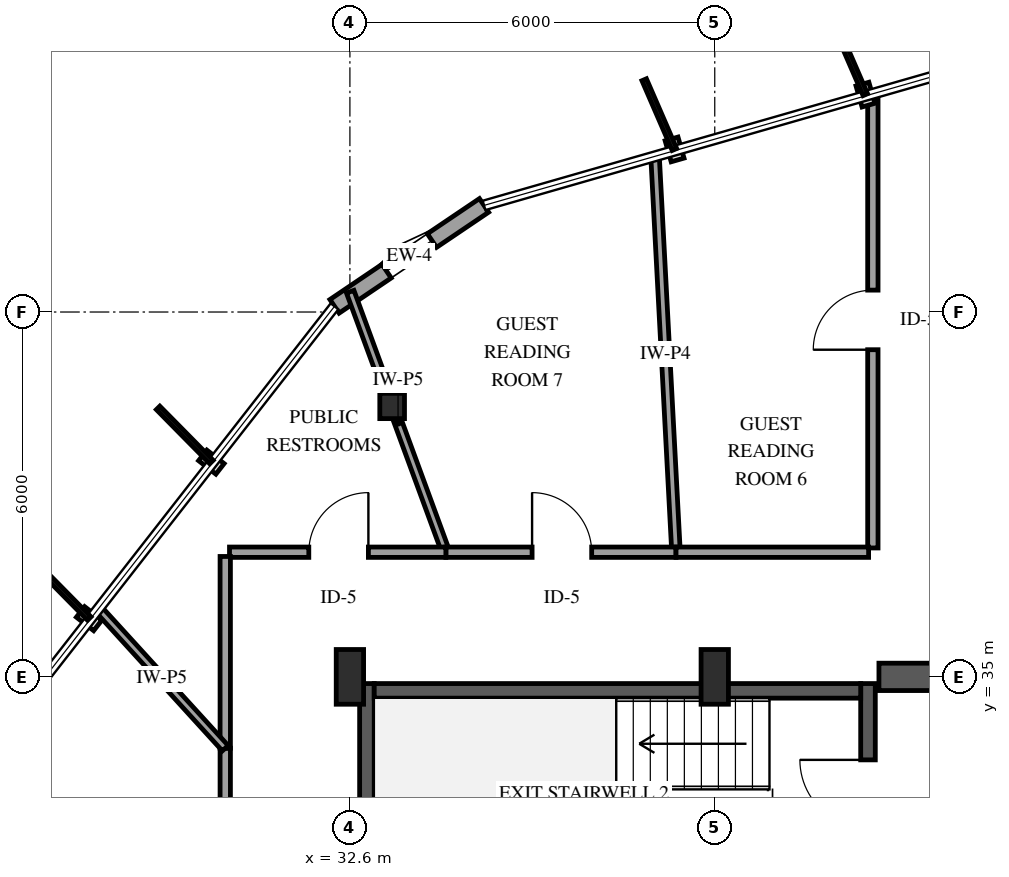
"""IFC4 building model, lengths in metres.
Left out: names, types, materials, properties, quantities, classifications, styles, units other than length and angle.
Written with IfcOpenShell. Run it as: python <this file> out.ifc"""

import sys

from ifc_helpers import new_model, si_unit, direction, frame, frame_2d, origin, origin_2d, place, context, subcontext, project, spatial, rectangle, i_section, extrude, element, fill, save


model = new_model("IFC4")
c1 = context("Model", 3, precision=1e-05, world=origin(), true_north=direction((0.0, 1.0)))
c2 = subcontext(c1, "Body", "Model", "MODEL_VIEW")
j1 = project(units=[si_unit("LENGTHUNIT", "METRE"), si_unit("PLANEANGLEUNIT", "RADIAN")], contexts=[c1])
p1 = place(None, origin())
s1 = spatial("IfcSite", under=j1, at=p1, CompositionType="ELEMENT")
p2 = place(p1, origin())
s2 = spatial("IfcBuilding", under=s1, at=p2, CompositionType="ELEMENT")
p3 = place(p2, frame((0.0, 0.0, 223.0)))
s3 = spatial("IfcBuildingStorey", under=s2, at=p3, CompositionType="ELEMENT", Elevation=223.0)
p4 = place(p3, frame((32.88, 31.26, 0.0), z_axis=(0.0, 0.0, 1.0), x_axis=(0.0, 1.0, 0.0)))
e1 = element("IfcWall", 1, at=p4, inside=s3, PredefinedType="SHEAR", context=c2, shape_type="SweptSolid", body=[
    extrude(rectangle(XDim=3.63, YDim=0.24, at=frame_2d((1.815, 0.0))), origin(), (0.0, 0.0, 1.0), 3.6),
])
p5 = place(p3, frame((41.12, 31.26, 0.0), z_axis=(0.0, 0.0, 1.0), x_axis=(0.0, 1.0, 0.0)))
e2 = element("IfcWall", 2, at=p5, inside=s3, PredefinedType="SHEAR", context=c2, shape_type="SweptSolid", body=[
    extrude(rectangle(XDim=3.63, YDim=0.24, at=frame_2d((1.815, 0.0))), origin(), (0.0, 0.0, 1.0), 3.6),
])
p6 = place(p5, frame((1.255, 0.0, 0.0)))
e3 = element("IfcOpeningElement", 3, at=p6, cuts=e2, PredefinedType="OPENING", context=c2, shape_type="SweptSolid", body=[
    extrude(rectangle(XDim=1.12, YDim=2.15, at=frame_2d((0.56, 1.075))), frame((0.0, 0.13, 0.0), z_axis=(0.0, -1.0, 0.0), x_axis=(1.0, 0.0, 0.0)), (0.0, 0.0, 1.0), 0.26),
])
p7 = place(p3, frame((33.0, 34.77, 0.0), z_axis=(0.0, 0.0, 1.0), x_axis=(1.0, 0.0, 0.0)))
e4 = element("IfcWall", 4, at=p7, inside=s3, PredefinedType="SHEAR", context=c2, shape_type="SweptSolid", body=[
    extrude(rectangle(XDim=8.0, YDim=0.24, at=frame_2d((4.0, 0.0))), origin(), (0.0, 0.0, 1.0), 3.6),
])
p8 = place(p3, frame((41.3, 35.0, 0.0), z_axis=(0.0, 0.0, 1.0), x_axis=(1.0, 0.0, 0.0)))
e5 = element("IfcWall", 5, at=p8, inside=s3, PredefinedType="SHEAR", context=c2, shape_type="SweptSolid", body=[
    extrude(rectangle(XDim=2.85, YDim=0.45, at=frame_2d((1.425, 0.0))), origin(), (0.0, 0.0, 1.0), 3.6),
])
for number, where, z_axis, x_axis in (
    (6, (32.6, 35.0, 0.0), (0.0, 0.0, 1.0), (1.0, 0.0, 0.0)),
    (7, (38.6, 35.0, 0.0), (0.0, 0.0, 1.0), (1.0, 0.0, 0.0)),
):
    element("IfcColumn", number, at=place(p3, frame(where, z_axis=z_axis, x_axis=x_axis)), inside=s3, PredefinedType="PILASTER", context=c2, shape_type="SweptSolid", body=[
        extrude(rectangle(XDim=0.45, YDim=0.9, at=origin_2d()), origin(), (0.0, 0.0, 1.0), 3.6),
    ])
p9 = place(p3, frame((33.295, 39.455, 0.0), z_axis=(0.0, 0.0, 1.0), x_axis=(1.0, 0.0, 0.0)))
e8 = element("IfcColumn", 8, at=p9, inside=s3, PredefinedType="COLUMN", context=c2, shape_type="SweptSolid", body=[
    extrude(i_section(OverallWidth=0.406, OverallDepth=0.416, WebThickness=0.03, FlangeThickness=0.048, FilletRadius=0.038, at=origin_2d()), origin(), (0.0, 0.0, 1.0), 3.6),
])
p10 = place(p3, frame((34.806, 42.753, 0.0), z_axis=(0.0, 0.0, 1.0), x_axis=(-0.828845811755, -0.559477095453, 0.0)))
e9 = element("IfcWall", 9, at=p10, inside=s3, PredefinedType="SOLIDWALL", context=c2, shape_type="SweptSolid", body=[
    extrude(rectangle(XDim=2.967, YDim=0.27, at=frame_2d((1.483, 0.0))), origin(), (0.0, 0.0, 1.0), 2.679),
])
p11 = place(p10, frame((1.033, 0.0, 0.75)))
e10 = element("IfcOpeningElement", 10, at=p11, cuts=e9, PredefinedType="OPENING", context=c2, shape_type="SweptSolid", body=[
    extrude(rectangle(XDim=0.9, YDim=1.5, at=frame_2d((0.45, 0.75))), frame((0.0, 0.145, 0.0), z_axis=(0.0, -1.0, 0.0), x_axis=(1.0, 0.0, 0.0)), (0.0, 0.0, 1.0), 0.29),
])
p12 = place(p3, frame((41.2, 37.12, 0.0), z_axis=(0.0, 0.0, 1.0), x_axis=(0.0, 1.0, 0.0)))
e11 = element("IfcWall", 11, at=p12, inside=s3, PredefinedType="PARTITIONING", context=c2, shape_type="SweptSolid", body=[
    extrude(rectangle(XDim=7.469, YDim=0.17, at=frame_2d((3.734, 0.0))), origin(), (0.0, 0.0, 1.0), 3.3),
])
p13 = place(p12, frame((3.26, 0.0, 0.0)))
e12 = element("IfcOpeningElement", 12, at=p13, cuts=e11, PredefinedType="OPENING", context=c2, shape_type="SweptSolid", body=[
    extrude(rectangle(XDim=0.98, YDim=2.15, at=frame_2d((0.49, 1.075))), frame((0.0, 0.095, 0.0), z_axis=(0.0, -1.0, 0.0), x_axis=(1.0, 0.0, 0.0)), (0.0, 0.0, 1.0), 0.19),
])
p14 = place(p3, frame((37.963, 37.05, 0.0), z_axis=(0.0, 0.0, 1.0), x_axis=(-0.052908653883, 0.998599356271, 0.0)))
e13 = element("IfcWall", 13, at=p14, inside=s3, PredefinedType="PARTITIONING", context=c2, shape_type="SweptSolid", body=[
    extrude(rectangle(XDim=6.52, YDim=0.14, at=frame_2d((3.26, 0.0))), origin(), (0.0, 0.0, 1.0), 3.3),
])
p15 = place(p3, frame((30.55, 28.351, 0.0), z_axis=(0.0, 0.0, 1.0), x_axis=(0.0, 1.0, 0.0)))
e14 = element("IfcWall", 14, at=p15, inside=s3, PredefinedType="PARTITIONING", context=c2, shape_type="SweptSolid", body=[
    extrude(rectangle(XDim=5.476, YDim=0.17, at=frame_2d((2.738, 0.0))), origin(), (0.0, 0.0, 1.0), 3.3),
])
p16 = place(p15, frame((2.263, 0.0, 0.0)))
e15 = element("IfcOpeningElement", 15, at=p16, cuts=e14, PredefinedType="OPENING", context=c2, shape_type="SweptSolid", body=[
    extrude(rectangle(XDim=0.98, YDim=2.15, at=frame_2d((0.49, 1.075))), frame((0.0, 0.095, 0.0), z_axis=(0.0, -1.0, 0.0), x_axis=(1.0, 0.0, 0.0)), (0.0, 0.0, 1.0), 0.19),
])
p17 = place(p3, frame((34.178, 37.05, 0.0), z_axis=(0.0, 0.0, 1.0), x_axis=(-0.34468374513, 0.93871886944, 0.0)))
e16 = element("IfcWall", 16, at=p17, inside=s3, PredefinedType="PARTITIONING", context=c2, shape_type="SweptSolid", body=[
    extrude(rectangle(XDim=4.563, YDim=0.13, at=frame_2d((2.282, 0.0))), origin(), (0.0, 0.0, 1.0), 2.595),
])
p18 = place(p3, frame((34.178, 37.05, 0.0), z_axis=(0.0, 0.0, 1.0), x_axis=(1.0, 0.0, 0.0)))
e17 = element("IfcWall", 17, at=p18, inside=s3, PredefinedType="PARTITIONING", context=c2, shape_type="SweptSolid", body=[
    extrude(rectangle(XDim=3.785, YDim=0.17, at=frame_2d((1.893, 0.0))), origin(), (0.0, 0.0, 1.0), 3.3),
])
p19 = place(p18, frame((1.418, 0.0, 0.0)))
e18 = element("IfcOpeningElement", 18, at=p19, cuts=e17, PredefinedType="OPENING", context=c2, shape_type="SweptSolid", body=[
    extrude(rectangle(XDim=0.98, YDim=2.15, at=frame_2d((0.49, 1.075))), frame((0.0, 0.095, 0.0), z_axis=(0.0, -1.0, 0.0), x_axis=(1.0, 0.0, 0.0)), (0.0, 0.0, 1.0), 0.19),
])
p20 = place(p3, frame((30.62, 37.05, 0.0), z_axis=(0.0, 0.0, 1.0), x_axis=(1.0, 0.0, 0.0)))
e19 = element("IfcWall", 19, at=p20, inside=s3, PredefinedType="PARTITIONING", context=c2, shape_type="SweptSolid", body=[
    extrude(rectangle(XDim=3.558, YDim=0.17, at=frame_2d((1.779, 0.0))), origin(), (0.0, 0.0, 1.0), 3.3),
])
p21 = place(p20, frame((1.304, 0.0, 0.0)))
e20 = element("IfcOpeningElement", 20, at=p21, cuts=e19, PredefinedType="OPENING", context=c2, shape_type="SweptSolid", body=[
    extrude(rectangle(XDim=0.98, YDim=2.15, at=frame_2d((0.49, 1.075))), frame((0.0, 0.095, 0.0), z_axis=(0.0, -1.0, 0.0), x_axis=(1.0, 0.0, 0.0)), (0.0, 0.0, 1.0), 0.19),
])
p22 = place(p3, frame((37.963, 37.05, 0.0), z_axis=(0.0, 0.0, 1.0), x_axis=(1.0, 0.0, 0.0)))
e21 = element("IfcWall", 21, at=p22, inside=s3, PredefinedType="PARTITIONING", context=c2, shape_type="SweptSolid", body=[
    extrude(rectangle(XDim=3.167, YDim=0.17, at=frame_2d((1.583, 0.0))), origin(), (0.0, 0.0, 1.0), 3.3),
])
p23 = place(p3, frame((30.55, 33.827, 0.0), z_axis=(0.0, 0.0, 1.0), x_axis=(0.0, 1.0, 0.0)))
e22 = element("IfcWall", 22, at=p23, inside=s3, PredefinedType="PARTITIONING", context=c2, shape_type="SweptSolid", body=[
    extrude(rectangle(XDim=3.153, YDim=0.17, at=frame_2d((1.577, 0.0))), origin(), (0.0, 0.0, 1.0), 3.3),
])
p24 = place(p3, frame((30.55, 33.827, 0.0), z_axis=(0.0, 0.0, 1.0), x_axis=(-0.673781691583, 0.738930464988, 0.0)))
e23 = element("IfcWall", 23, at=p24, inside=s3, PredefinedType="PARTITIONING", context=c2, shape_type="SweptSolid", body=[
    extrude(rectangle(XDim=3.099, YDim=0.13, at=frame_2d((1.55, 0.0))), origin(), (0.0, 0.0, 1.0), 3.3),
])
p25 = place(p11, origin())
e24 = element("IfcWindow", 24, at=p25, inside=s3, PartitioningType="SINGLE_PANEL", PredefinedType="WINDOW", context=c2, shape_type="SweptSolid", body=[
    extrude(rectangle(XDim=0.9, YDim=1.5, at=frame_2d((0.45, 0.75))), frame((0.0, 0.03, 0.0), z_axis=(0.0, -1.0, 0.0), x_axis=(1.0, 0.0, 0.0)), (0.0, 0.0, 1.0), 0.06),
])
fill(e10, e24)
p26 = place(p6, origin())
e25 = element("IfcDoor", 25, at=p26, inside=s3, OperationType="SINGLE_SWING_RIGHT", PredefinedType="DOOR", context=c2, shape_type="SweptSolid", body=[
    extrude(rectangle(XDim=1.12, YDim=2.15, at=frame_2d((0.56, 1.075))), frame((0.0, 0.025, 0.0), z_axis=(0.0, -1.0, 0.0), x_axis=(1.0, 0.0, 0.0)), (0.0, 0.0, 1.0), 0.05),
])
fill(e3, e25)
p27 = place(p13, origin())
e26 = element("IfcDoor", 26, at=p27, inside=s3, OperationType="SINGLE_SWING_LEFT", PredefinedType="DOOR", context=c2, shape_type="SweptSolid", body=[
    extrude(rectangle(XDim=0.98, YDim=2.15, at=frame_2d((0.49, 1.075))), frame((0.0, 0.025, 0.0), z_axis=(0.0, -1.0, 0.0), x_axis=(1.0, 0.0, 0.0)), (0.0, 0.0, 1.0), 0.05),
])
fill(e12, e26)
p28 = place(p19, origin())
e27 = element("IfcDoor", 27, at=p28, inside=s3, OperationType="SINGLE_SWING_LEFT", PredefinedType="DOOR", context=c2, shape_type="SweptSolid", body=[
    extrude(rectangle(XDim=0.98, YDim=2.15, at=frame_2d((0.49, 1.075))), frame((0.0, 0.025, 0.0), z_axis=(0.0, -1.0, 0.0), x_axis=(1.0, 0.0, 0.0)), (0.0, 0.0, 1.0), 0.05),
])
fill(e18, e27)
p29 = place(p21, origin())
e28 = element("IfcDoor", 28, at=p29, inside=s3, OperationType="SINGLE_SWING_RIGHT", PredefinedType="DOOR", context=c2, shape_type="SweptSolid", body=[
    extrude(rectangle(XDim=0.98, YDim=2.15, at=frame_2d((0.49, 1.075))), frame((0.0, 0.025, 0.0), z_axis=(0.0, -1.0, 0.0), x_axis=(1.0, 0.0, 0.0)), (0.0, 0.0, 1.0), 0.05),
])
fill(e20, e28)
save(model, sys.argv[1])
